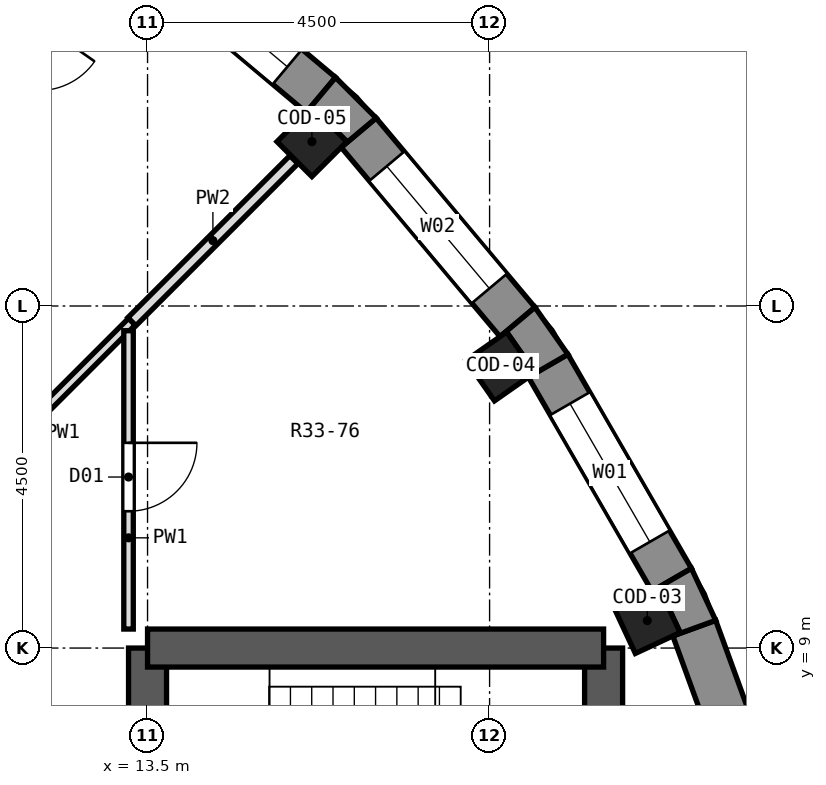
"""IFC4 building model, lengths in metres.
Left out: names, types, materials, properties, quantities, classifications, styles, units other than length and angle.
Written with IfcOpenShell. Run it as: python <this file> out.ifc"""

import sys

from ifc_helpers import new_model, si_unit, direction, frame, frame_2d, origin, origin_2d, place, context, subcontext, project, spatial, polyline, rectangle, outline, extrude, element, fill, save


model = new_model("IFC4")
c1 = context("Model", 3, precision=1e-05, world=origin(), true_north=direction((0.0, 1.0)))
c2 = subcontext(c1, "Body", "Model", "MODEL_VIEW")
j1 = project(units=[si_unit("LENGTHUNIT", "METRE"), si_unit("PLANEANGLEUNIT", "RADIAN")], contexts=[c1])
p1 = place(None, origin())
s1 = spatial("IfcSite", under=j1, at=p1, CompositionType="ELEMENT")
p2 = place(p1, origin())
s2 = spatial("IfcBuilding", under=s1, at=p2, CompositionType="ELEMENT")
p3 = place(p2, frame((0.0, 0.0, 229.7)))
s3 = spatial("IfcBuildingStorey", under=s2, at=p3, CompositionType="ELEMENT", Elevation=229.7)
for number, where, z_axis, x_axis in (
    (1, (20.075, 9.361, 0.0), (0.0, 0.0, 1.0), (0.906, 0.423, 0.0)),
    (2, (18.144, 12.705, 0.0), (0.0, 0.0, 1.0), (0.819, 0.574, 0.0)),
    (3, (15.662, 15.662, 0.0), (0.0, 0.0, 1.0), (0.707, 0.707, 0.0)),
):
    element("IfcColumn", number, at=place(p3, frame(where, z_axis=z_axis, x_axis=x_axis)), inside=s3, PredefinedType="COLUMN", context=c2, shape_type="SweptSolid", body=[
        extrude(rectangle(XDim=0.65, YDim=0.65, at=origin_2d()), origin(), (0.0, 0.0, 1.0), 3.3),
    ])
p4 = place(p3, frame((13.5, -9.0, 0.0), z_axis=(0.0, 0.0, 1.0), x_axis=(0.0, 1.0, 0.0)))
e4 = element("IfcWall", 4, at=p4, inside=s3, PredefinedType="SHEAR", context=c2, shape_type="SweptSolid", body=[
    extrude(rectangle(XDim=18.0, YDim=0.5, at=frame_2d((9.0, 0.0))), origin(), (0.0, 0.0, 1.0), 3.3),
])
p5 = place(p4, frame((15.4, 0.0, 0.0)))
e5 = element("IfcOpeningElement", 5, at=p5, cuts=e4, PredefinedType="OPENING", context=c2, shape_type="SweptSolid", body=[
    extrude(rectangle(XDim=1.2, YDim=2.1, at=frame_2d((0.6, 1.05))), frame((0.0, 0.262, 0.0), z_axis=(0.0, -1.0, 0.0), x_axis=(1.0, 0.0, 0.0)), (0.0, 0.0, 1.0), 0.524),
])
p6 = place(p4, frame((1.4, 0.0, 0.0)))
e6 = element("IfcOpeningElement", 6, at=p6, cuts=e4, PredefinedType="OPENING", context=c2, shape_type="SweptSolid", body=[
    extrude(rectangle(XDim=1.2, YDim=2.1, at=frame_2d((0.6, 1.05))), frame((0.0, 0.262, 0.0), z_axis=(0.0, -1.0, 0.0), x_axis=(1.0, 0.0, 0.0)), (0.0, 0.0, 1.0), 0.524),
])
p7 = place(p4, frame((7.5, 0.0, 0.0)))
e7 = element("IfcOpeningElement", 7, at=p7, cuts=e4, PredefinedType="OPENING", context=c2, shape_type="SweptSolid", body=[
    extrude(rectangle(XDim=3.0, YDim=2.4, at=frame_2d((1.5, 1.2))), frame((0.0, 0.262, 0.0), z_axis=(0.0, -1.0, 0.0), x_axis=(1.0, 0.0, 0.0)), (0.0, 0.0, 1.0), 0.524),
])
p8 = place(p3, frame((19.5, -9.0, 0.0), z_axis=(0.0, 0.0, 1.0), x_axis=(0.0, 1.0, 0.0)))
e8 = element("IfcWall", 8, at=p8, inside=s3, PredefinedType="SHEAR", context=c2, shape_type="SweptSolid", body=[
    extrude(rectangle(XDim=18.0, YDim=0.5, at=frame_2d((9.0, 0.0))), origin(), (0.0, 0.0, 1.0), 3.3),
])
p9 = place(p8, frame((9.45, 0.0, 0.0)))
e9 = element("IfcOpeningElement", 9, at=p9, cuts=e8, PredefinedType="OPENING", context=c2, shape_type="SweptSolid", body=[
    extrude(rectangle(XDim=0.9, YDim=2.1, at=frame_2d((0.45, 1.05))), frame((0.0, 0.262, 0.0), z_axis=(0.0, -1.0, 0.0), x_axis=(1.0, 0.0, 0.0)), (0.0, 0.0, 1.0), 0.524),
])
p10 = place(p8, frame((7.65, 0.0, 0.0)))
e10 = element("IfcOpeningElement", 10, at=p10, cuts=e8, PredefinedType="OPENING", context=c2, shape_type="SweptSolid", body=[
    extrude(rectangle(XDim=0.9, YDim=2.1, at=frame_2d((0.45, 1.05))), frame((0.0, 0.262, 0.0), z_axis=(0.0, -1.0, 0.0), x_axis=(1.0, 0.0, 0.0)), (0.0, 0.0, 1.0), 0.524),
])
p11 = place(p3, frame((13.5, 9.0, 0.0), z_axis=(0.0, 0.0, 1.0), x_axis=(1.0, 0.0, 0.0)))
e11 = element("IfcWall", 11, at=p11, inside=s3, PredefinedType="SHEAR", context=c2, shape_type="SweptSolid", body=[
    extrude(rectangle(XDim=6.0, YDim=0.5, at=frame_2d((3.0, 0.0))), origin(), (0.0, 0.0, 1.0), 3.3),
])
p12 = place(p3, frame((21.805, 6.206, 0.0), z_axis=(0.0, 0.0, 1.0), x_axis=(-0.342056509473, 0.939679383794, 0.0)))
e12 = element("IfcWall", 12, at=p12, inside=s3, PredefinedType="SOLIDWALL", context=c2, shape_type="SweptSolid", body=[
    extrude(rectangle(XDim=3.252, YDim=0.6, at=frame_2d((1.626, 0.0))), origin(), (0.0, 0.0, 1.0), 2.9),
])
p13 = place(p3, frame((20.396, 9.898, 0.0), z_axis=(0.0, 0.0, 1.0), x_axis=(-0.500014901547, 0.866016800201, 0.0)))
e13 = element("IfcWall", 13, at=p13, inside=s3, PredefinedType="SOLIDWALL", context=c2, shape_type="SweptSolid", body=[
    extrude(rectangle(XDim=3.252, YDim=0.6, at=frame_2d((1.626, 0.0))), origin(), (0.0, 0.0, 1.0), 2.9),
])
p14 = place(p13, frame((0.576, 0.0, 0.9)))
e14 = element("IfcOpeningElement", 14, at=p14, cuts=e13, PredefinedType="OPENING", context=c2, shape_type="SweptSolid", body=[
    extrude(rectangle(XDim=2.1, YDim=1.8, at=frame_2d((1.05, 0.9))), frame((0.0, 0.312, 0.0), z_axis=(0.0, -1.0, 0.0), x_axis=(1.0, 0.0, 0.0)), (0.0, 0.0, 1.0), 0.624),
])
p15 = place(p3, frame((18.367, 13.29, 0.0), z_axis=(0.0, 0.0, 1.0), x_axis=(-0.64277291405, 0.766056773982, 0.0)))
e15 = element("IfcWall", 15, at=p15, inside=s3, PredefinedType="SOLIDWALL", context=c2, shape_type="SweptSolid", body=[
    extrude(rectangle(XDim=3.252, YDim=0.6, at=frame_2d((1.626, 0.0))), origin(), (0.0, 0.0, 1.0), 2.9),
])
p16 = place(p15, frame((0.576, 0.0, 0.9)))
e16 = element("IfcOpeningElement", 16, at=p16, cuts=e15, PredefinedType="OPENING", context=c2, shape_type="SweptSolid", body=[
    extrude(rectangle(XDim=2.1, YDim=1.8, at=frame_2d((1.05, 0.9))), frame((0.0, 0.312, 0.0), z_axis=(0.0, -1.0, 0.0), x_axis=(1.0, 0.0, 0.0)), (0.0, 0.0, 1.0), 0.624),
])
p17 = place(p3, frame((15.781, 16.277, 0.0), z_axis=(0.0, 0.0, 1.0), x_axis=(-0.766056773982, 0.64277291405, 0.0)))
e17 = element("IfcWall", 17, at=p17, inside=s3, PredefinedType="SOLIDWALL", context=c2, shape_type="SweptSolid", body=[
    extrude(rectangle(XDim=3.252, YDim=0.6, at=frame_2d((1.626, 0.0))), origin(), (0.0, 0.0, 1.0), 2.9),
])
p18 = place(p17, frame((0.576, 0.0, 0.9)))
e18 = element("IfcOpeningElement", 18, at=p18, cuts=e17, PredefinedType="OPENING", context=c2, shape_type="SweptSolid", body=[
    extrude(rectangle(XDim=2.1, YDim=1.8, at=frame_2d((1.05, 0.9))), frame((0.0, 0.312, 0.0), z_axis=(0.0, -1.0, 0.0), x_axis=(1.0, 0.0, 0.0)), (0.0, 0.0, 1.0), 0.624),
])
p19 = place(p3, origin())
e19 = element("IfcWall", 19, at=p19, inside=s3, PredefinedType="SOLIDWALL", context=c2, shape_type="SweptSolid", body=[
    extrude(outline(polyline([(20.975, 9.364), (20.656, 10.048), (20.136, 9.748), (20.232, 9.793), (20.507, 9.204), (20.411, 9.159), (20.975, 9.364)])), origin(), (0.0, 0.0, 1.0), 2.9),
])
p20 = place(p3, origin())
e20 = element("IfcWall", 20, at=p20, inside=s3, PredefinedType="SOLIDWALL", context=c2, shape_type="SweptSolid", body=[
    extrude(outline(polyline([(19.03, 12.864), (18.597, 13.482), (18.137, 13.097), (18.224, 13.157), (18.597, 12.625), (18.51, 12.564), (19.03, 12.864)])), origin(), (0.0, 0.0, 1.0), 2.9),
])
p21 = place(p3, origin())
e21 = element("IfcWall", 21, at=p21, inside=s3, PredefinedType="SOLIDWALL", context=c2, shape_type="SweptSolid", body=[
    extrude(outline(polyline([(15.973, 16.507), (15.588, 16.047), (15.662, 16.122), (16.122, 15.662), (16.047, 15.588), (16.507, 15.973), (15.973, 16.507)])), origin(), (0.0, 0.0, 1.0), 2.9),
])
p22 = place(p3, frame((10.373, 10.373, 0.0), z_axis=(0.0, 0.0, 1.0), x_axis=(0.707106781187, 0.707106781187, 0.0)))
e22 = element("IfcWall", 22, at=p22, inside=s3, PredefinedType="PARTITIONING", context=c2, shape_type="SweptSolid", body=[
    extrude(rectangle(XDim=4.131, YDim=0.125, at=frame_2d((2.065, 0.0))), origin(), (0.0, 0.0, 1.0), 2.9),
])
p23 = place(p3, frame((13.294, 13.294, 0.0), z_axis=(0.0, 0.0, 1.0), x_axis=(0.707106781187, 0.707106781187, 0.0)))
e23 = element("IfcWall", 23, at=p23, inside=s3, PredefinedType="PARTITIONING", context=c2, shape_type="SweptSolid", body=[
    extrude(rectangle(XDim=3.014, YDim=0.15, at=frame_2d((1.507, 0.0))), origin(), (0.0, 0.0, 1.0), 2.9),
])
p24 = place(p3, frame((10.234, 14.616, 0.0), z_axis=(0.0, 0.0, 1.0), x_axis=(0.573631457717, 0.81911351516, 0.0)))
e24 = element("IfcWall", 24, at=p24, inside=s3, PredefinedType="PARTITIONING", context=c2, shape_type="SweptSolid", body=[
    extrude(rectangle(XDim=3.972, YDim=0.125, at=frame_2d((1.986, 0.0))), origin(), (0.0, 0.0, 1.0), 2.9),
])
p25 = place(p24, frame((2.296, 0.0, 0.0)))
e25 = element("IfcOpeningElement", 25, at=p25, cuts=e24, PredefinedType="OPENING", context=c2, shape_type="SweptSolid", body=[
    extrude(rectangle(XDim=0.9, YDim=2.1, at=frame_2d((0.45, 1.05))), frame((0.0, 0.074, 0.0), z_axis=(0.0, -1.0, 0.0), x_axis=(1.0, 0.0, 0.0)), (0.0, 0.0, 1.0), 0.149),
])
p26 = place(p3, frame((13.25, 9.25, 0.0), z_axis=(0.0, 0.0, 1.0), x_axis=(0.0, 1.0, 0.0)))
e26 = element("IfcWall", 26, at=p26, inside=s3, PredefinedType="PARTITIONING", context=c2, shape_type="SweptSolid", body=[
    extrude(rectangle(XDim=3.925, YDim=0.125, at=frame_2d((1.962, 0.0))), origin(), (0.0, 0.0, 1.0), 2.9),
])
p27 = place(p26, frame((1.55, 0.0, 0.0)))
e27 = element("IfcOpeningElement", 27, at=p27, cuts=e26, PredefinedType="OPENING", context=c2, shape_type="SweptSolid", body=[
    extrude(rectangle(XDim=0.9, YDim=2.1, at=frame_2d((0.45, 1.05))), frame((0.0, 0.074, 0.0), z_axis=(0.0, -1.0, 0.0), x_axis=(1.0, 0.0, 0.0)), (0.0, 0.0, 1.0), 0.149),
])
p28 = place(p14, origin())
e28 = element("IfcWindow", 28, at=p28, inside=s3, PartitioningType="SINGLE_PANEL", PredefinedType="WINDOW", context=c2, shape_type="SweptSolid", body=[
    extrude(rectangle(XDim=2.1, YDim=1.8, at=frame_2d((1.05, 0.9))), frame((0.0, 0.18, 0.0), z_axis=(0.0, -1.0, 0.0), x_axis=(1.0, 0.0, 0.0)), (0.0, 0.0, 1.0), 0.06),
])
fill(e14, e28)
p29 = place(p16, origin())
e29 = element("IfcWindow", 29, at=p29, inside=s3, PartitioningType="SINGLE_PANEL", PredefinedType="WINDOW", context=c2, shape_type="SweptSolid", body=[
    extrude(rectangle(XDim=2.1, YDim=1.8, at=frame_2d((1.05, 0.9))), frame((0.0, 0.18, 0.0), z_axis=(0.0, -1.0, 0.0), x_axis=(1.0, 0.0, 0.0)), (0.0, 0.0, 1.0), 0.06),
])
fill(e16, e29)
p30 = place(p18, origin())
e30 = element("IfcWindow", 30, at=p30, inside=s3, PartitioningType="SINGLE_PANEL", PredefinedType="WINDOW", context=c2, shape_type="SweptSolid", body=[
    extrude(rectangle(XDim=2.1, YDim=1.8, at=frame_2d((1.05, 0.9))), frame((0.0, 0.18, 0.0), z_axis=(0.0, -1.0, 0.0), x_axis=(1.0, 0.0, 0.0)), (0.0, 0.0, 1.0), 0.06),
])
fill(e18, e30)
p31 = place(p27, frame((0.9, 0.0, 0.0), z_axis=(0.0, 0.0, 1.0), x_axis=(-1.0, 0.0, 0.0)))
e31 = element("IfcDoor", 31, at=p31, inside=s3, OperationType="SINGLE_SWING_LEFT", PredefinedType="DOOR", context=c2, shape_type="SweptSolid", body=[
    extrude(rectangle(XDim=0.9, YDim=2.1, at=frame_2d((0.45, 1.05))), frame((0.0, 0.025, 0.0), z_axis=(0.0, -1.0, 0.0), x_axis=(1.0, 0.0, 0.0)), (0.0, 0.0, 1.0), 0.05),
])
fill(e27, e31)
save(model, sys.argv[1])
